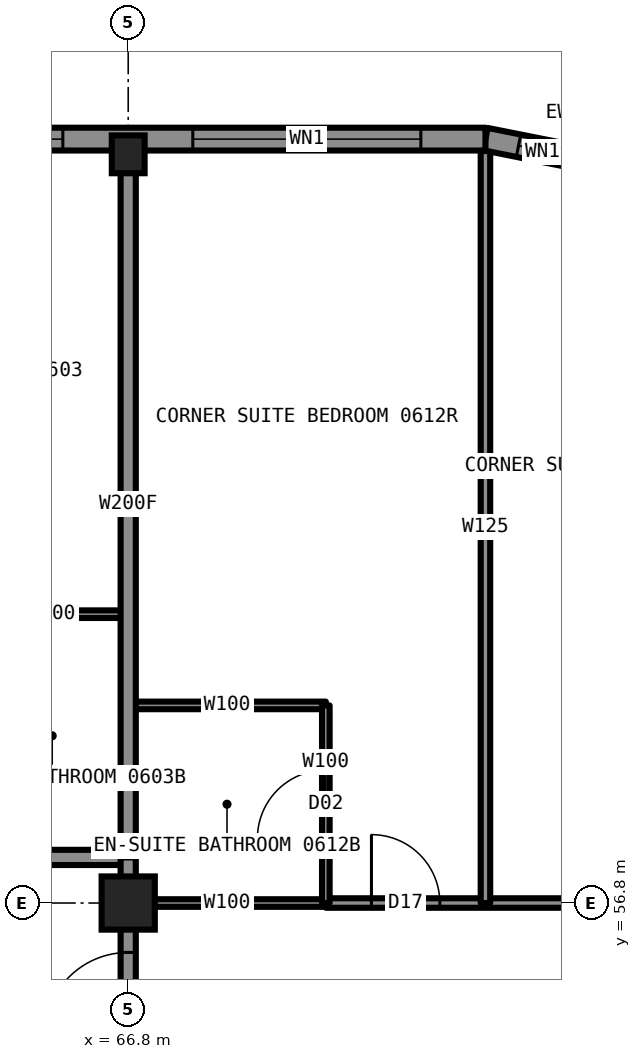
"""IFC4 building model, lengths in metres.
Left out: names, types, materials, properties, quantities, classifications, styles, units other than length and angle.
Written with IfcOpenShell. Run it as: python <this file> out.ifc"""

import sys

from ifc_helpers import new_model, si_unit, direction, frame, frame_2d, origin, origin_2d, place, context, subcontext, project, spatial, rectangle, hollow_rectangle, i_section, extrude, element, fill, save


model = new_model("IFC4")
c1 = context("Model", 3, precision=1e-05, world=origin(), true_north=direction((0.0, 1.0)))
c2 = subcontext(c1, "Body", "Model", "MODEL_VIEW")
j1 = project(units=[si_unit("LENGTHUNIT", "METRE"), si_unit("PLANEANGLEUNIT", "RADIAN")], contexts=[c1])
p1 = place(None, origin())
s1 = spatial("IfcSite", under=j1, at=p1, CompositionType="ELEMENT")
p2 = place(p1, origin())
s2 = spatial("IfcBuilding", under=s1, at=p2, CompositionType="ELEMENT")
p3 = place(p2, frame((0.0, 0.0, 28.5)))
s3 = spatial("IfcBuildingStorey", under=s2, at=p3, CompositionType="ELEMENT", Elevation=28.5)
p4 = place(p3, frame((66.8, 66.65, 0.0), z_axis=(0.0, 0.0, 1.0), x_axis=(1.0, 0.0, 0.0)))
e1 = element("IfcColumn", 1, at=p4, inside=s3, PredefinedType="COLUMN", context=c2, shape_type="SweptSolid", body=[
    extrude(i_section(OverallWidth=0.432, OverallDepth=0.498, WebThickness=0.056, FlangeThickness=0.089, at=origin_2d()), origin(), (0.0, 0.0, 1.0), 3.5),
])
p5 = place(p3, frame((66.8, 56.8, 0.0), z_axis=(0.0, 0.0, 1.0), x_axis=(1.0, 0.0, 0.0)))
e2 = element("IfcColumn", 2, at=p5, inside=s3, PredefinedType="COLUMN", context=c2, shape_type="SweptSolid", body=[
    extrude(hollow_rectangle(XDim=0.7, YDim=0.7, WallThickness=0.06, at=origin_2d()), origin(), (0.0, 0.0, 1.0), 3.5),
])
p6 = place(p3, frame((66.8, 56.8, 0.0), z_axis=(0.0, 0.0, 1.0), x_axis=(1.0, 0.0, 0.0)))
e3 = element("IfcWall", 3, at=p6, inside=s3, PredefinedType="PARTITIONING", context=c2, shape_type="SweptSolid", body=[
    extrude(rectangle(XDim=2.6, YDim=0.1, at=frame_2d((1.3, 0.0))), origin(), (0.0, 0.0, 1.0), 2.573),
])
p7 = place(p3, frame((69.4, 56.8, 0.0), z_axis=(0.0, 0.0, 1.0), x_axis=(1.0, 0.0, 0.0)))
e4 = element("IfcWall", 4, at=p7, inside=s3, PredefinedType="PARTITIONING", context=c2, shape_type="SweptSolid", body=[
    extrude(rectangle(XDim=7.3, YDim=0.125, at=frame_2d((3.65, 0.0))), origin(), (0.0, 0.0, 1.0), 2.573),
])
p8 = place(p7, frame((0.6, 0.0, 0.0)))
e5 = element("IfcOpeningElement", 5, at=p8, cuts=e4, PredefinedType="OPENING", context=c2, shape_type="SweptSolid", body=[
    extrude(rectangle(XDim=0.9, YDim=2.2, at=frame_2d((0.45, 1.1))), frame((0.0, 0.073, 0.0), z_axis=(0.0, -1.0, 0.0), x_axis=(1.0, 0.0, 0.0)), (0.0, 0.0, 1.0), 0.145),
])
p9 = place(p7, frame((4.4, 0.0, 0.0)))
e6 = element("IfcOpeningElement", 6, at=p9, cuts=e4, PredefinedType="OPENING", context=c2, shape_type="SweptSolid", body=[
    extrude(rectangle(XDim=0.9, YDim=2.2, at=frame_2d((0.45, 1.1))), frame((0.0, 0.073, 0.0), z_axis=(0.0, -1.0, 0.0), x_axis=(1.0, 0.0, 0.0)), (0.0, 0.0, 1.0), 0.145),
])
p10 = place(p3, frame((43.2, 57.4, 0.0), z_axis=(0.0, 0.0, 1.0), x_axis=(1.0, 0.0, 0.0)))
e7 = element("IfcWall", 7, at=p10, inside=s3, PredefinedType="PARTITIONING", context=c2, shape_type="SweptSolid", body=[
    extrude(rectangle(XDim=23.6, YDim=0.2, at=frame_2d((11.8, 0.0))), origin(), (0.0, 0.0, 1.0), 3.33),
])
p11 = place(p10, frame((1.85, 0.0, 0.0)))
e8 = element("IfcOpeningElement", 8, at=p11, cuts=e7, PredefinedType="OPENING", context=c2, shape_type="SweptSolid", body=[
    extrude(rectangle(XDim=1.1, YDim=2.2, at=frame_2d((0.55, 1.1))), frame((0.0, 0.11, 0.0), z_axis=(0.0, -1.0, 0.0), x_axis=(1.0, 0.0, 0.0)), (0.0, 0.0, 1.0), 0.22),
])
p12 = place(p10, frame((15.62, 0.0, 0.0)))
e9 = element("IfcOpeningElement", 9, at=p12, cuts=e7, PredefinedType="OPENING", context=c2, shape_type="SweptSolid", body=[
    extrude(rectangle(XDim=1.0, YDim=2.2, at=frame_2d((0.5, 1.1))), frame((0.0, 0.11, 0.0), z_axis=(0.0, -1.0, 0.0), x_axis=(1.0, 0.0, 0.0)), (0.0, 0.0, 1.0), 0.22),
])
p13 = place(p10, frame((20.34, 0.0, 0.0)))
e10 = element("IfcOpeningElement", 10, at=p13, cuts=e7, PredefinedType="OPENING", context=c2, shape_type="SweptSolid", body=[
    extrude(rectangle(XDim=1.0, YDim=2.2, at=frame_2d((0.5, 1.1))), frame((0.0, 0.11, 0.0), z_axis=(0.0, -1.0, 0.0), x_axis=(1.0, 0.0, 0.0)), (0.0, 0.0, 1.0), 0.22),
])
p14 = place(p3, frame((66.8, 59.4, 0.0), z_axis=(0.0, 0.0, 1.0), x_axis=(1.0, 0.0, 0.0)))
e11 = element("IfcWall", 11, at=p14, inside=s3, PredefinedType="PARTITIONING", context=c2, shape_type="SweptSolid", body=[
    extrude(rectangle(XDim=2.6, YDim=0.1, at=frame_2d((1.3, 0.0))), origin(), (0.0, 0.0, 1.0), 3.33),
])
p15 = place(p3, frame((64.8, 60.6, 0.0), z_axis=(0.0, 0.0, 1.0), x_axis=(1.0, 0.0, 0.0)))
e12 = element("IfcWall", 12, at=p15, inside=s3, PredefinedType="PARTITIONING", context=c2, shape_type="SweptSolid", body=[
    extrude(rectangle(XDim=2.0, YDim=0.1, at=frame_2d((1.0, 0.0))), origin(), (0.0, 0.0, 1.0), 3.33),
])
p16 = place(p3, frame((66.8, 33.22, 0.0), z_axis=(0.0, 0.0, 1.0), x_axis=(0.0, 1.0, 0.0)))
e13 = element("IfcWall", 13, at=p16, inside=s3, PredefinedType="PARTITIONING", context=c2, shape_type="SweptSolid", body=[
    extrude(rectangle(XDim=23.56, YDim=0.2, at=frame_2d((11.78, 0.0))), origin(), (0.0, 0.0, 1.0), 3.33),
])
p17 = place(p16, frame((7.85, 0.0, 0.0)))
e14 = element("IfcOpeningElement", 14, at=p17, cuts=e13, PredefinedType="OPENING", context=c2, shape_type="SweptSolid", body=[
    extrude(rectangle(XDim=1.0, YDim=2.2, at=frame_2d((0.5, 1.1))), frame((0.0, 0.11, 0.0), z_axis=(0.0, -1.0, 0.0), x_axis=(1.0, 0.0, 0.0)), (0.0, 0.0, 1.0), 0.22),
])
p18 = place(p16, frame((12.42, 0.0, 0.0)))
e15 = element("IfcOpeningElement", 15, at=p18, cuts=e13, PredefinedType="OPENING", context=c2, shape_type="SweptSolid", body=[
    extrude(rectangle(XDim=1.0, YDim=2.2, at=frame_2d((0.5, 1.1))), frame((0.0, 0.11, 0.0), z_axis=(0.0, -1.0, 0.0), x_axis=(1.0, 0.0, 0.0)), (0.0, 0.0, 1.0), 0.22),
])
p19 = place(p16, frame((21.83, 0.0, 0.0)))
e16 = element("IfcOpeningElement", 16, at=p19, cuts=e13, PredefinedType="OPENING", context=c2, shape_type="SweptSolid", body=[
    extrude(rectangle(XDim=1.1, YDim=2.2, at=frame_2d((0.55, 1.1))), frame((0.0, 0.11, 0.0), z_axis=(0.0, -1.0, 0.0), x_axis=(1.0, 0.0, 0.0)), (0.0, 0.0, 1.0), 0.22),
])
p20 = place(p16, frame((0.63, 0.0, 0.0)))
e17 = element("IfcOpeningElement", 17, at=p20, cuts=e13, PredefinedType="OPENING", context=c2, shape_type="SweptSolid", body=[
    extrude(rectangle(XDim=1.1, YDim=2.2, at=frame_2d((0.55, 1.1))), frame((0.0, 0.11, 0.0), z_axis=(0.0, -1.0, 0.0), x_axis=(1.0, 0.0, 0.0)), (0.0, 0.0, 1.0), 0.22),
])
p21 = place(p3, frame((66.8, 57.4, 0.0), z_axis=(0.0, 0.0, 1.0), x_axis=(0.0, 1.0, 0.0)))
e18 = element("IfcWall", 18, at=p21, inside=s3, PredefinedType="PARTITIONING", context=c2, shape_type="SweptSolid", body=[
    extrude(rectangle(XDim=9.3, YDim=0.2, at=frame_2d((4.65, 0.0))), origin(), (0.0, 0.0, 1.0), 2.573),
])
p22 = place(p3, frame((69.4, 56.8, 0.0), z_axis=(0.0, 0.0, 1.0), x_axis=(0.0, 1.0, 0.0)))
e19 = element("IfcWall", 19, at=p22, inside=s3, PredefinedType="PARTITIONING", context=c2, shape_type="SweptSolid", body=[
    extrude(rectangle(XDim=2.6, YDim=0.1, at=frame_2d((1.3, 0.0))), origin(), (0.0, 0.0, 1.0), 3.33),
])
p23 = place(p22, frame((0.85, 0.0, 0.0)))
e20 = element("IfcOpeningElement", 20, at=p23, cuts=e19, PredefinedType="OPENING", context=c2, shape_type="SweptSolid", body=[
    extrude(rectangle(XDim=0.9, YDim=2.1, at=frame_2d((0.45, 1.05))), frame((0.0, 0.06, 0.0), z_axis=(0.0, -1.0, 0.0), x_axis=(1.0, 0.0, 0.0)), (0.0, 0.0, 1.0), 0.12),
])
p24 = place(p3, frame((71.5, 56.8, 0.0), z_axis=(0.0, 0.0, 1.0), x_axis=(0.0, 1.0, 0.0)))
e21 = element("IfcWall", 21, at=p24, inside=s3, PredefinedType="PARTITIONING", context=c2, shape_type="SweptSolid", body=[
    extrude(rectangle(XDim=9.894, YDim=0.125, at=frame_2d((4.947, 0.0))), origin(), (0.0, 0.0, 1.0), 3.33),
])
p25 = place(p3, frame((73.547, 66.443, 0.0), z_axis=(0.0, 0.0, 1.0), x_axis=(-0.980787050784, 0.195081421501, 0.0)))
e22 = element("IfcWall", 22, at=p25, inside=s3, PredefinedType="SOLIDWALL", context=c2, shape_type="SweptSolid", body=[
    extrude(rectangle(XDim=2.087, YDim=0.3, at=frame_2d((1.044, 0.0))), origin(), (0.0, 0.0, 1.0), 3.33),
])
p26 = place(p25, frame((0.844, 0.0, 0.5)))
e23 = element("IfcOpeningElement", 23, at=p26, cuts=e22, PredefinedType="OPENING", context=c2, shape_type="SweptSolid", body=[
    extrude(rectangle(XDim=0.8, YDim=1.1, at=frame_2d((0.4, 0.55))), frame((0.0, 0.16, 0.0), z_axis=(0.0, -1.0, 0.0), x_axis=(1.0, 0.0, 0.0)), (0.0, 0.0, 1.0), 0.32),
])
p27 = place(p3, frame((71.5, 66.85, 0.0), z_axis=(0.0, 0.0, 1.0), x_axis=(-1.0, 0.0, 0.0)))
e24 = element("IfcWall", 24, at=p27, inside=s3, PredefinedType="SOLIDWALL", context=c2, shape_type="SweptSolid", body=[
    extrude(rectangle(XDim=33.0, YDim=0.3, at=frame_2d((16.5, 0.0))), origin(), (0.0, 0.0, 1.0), 2.83),
])
p28 = place(p27, frame((0.85, 0.0, 0.5)))
e25 = element("IfcOpeningElement", 25, at=p28, cuts=e24, PredefinedType="OPENING", context=c2, shape_type="SweptSolid", body=[
    extrude(rectangle(XDim=3.0, YDim=2.0, at=frame_2d((1.5, 1.0))), frame((0.0, 0.16, 0.0), z_axis=(0.0, -1.0, 0.0), x_axis=(1.0, 0.0, 0.0)), (0.0, 0.0, 1.0), 0.32),
])
p29 = place(p27, frame((5.56, 0.0, 0.5)))
e26 = element("IfcOpeningElement", 26, at=p29, cuts=e24, PredefinedType="OPENING", context=c2, shape_type="SweptSolid", body=[
    extrude(rectangle(XDim=3.0, YDim=2.0, at=frame_2d((1.5, 1.0))), frame((0.0, 0.16, 0.0), z_axis=(0.0, -1.0, 0.0), x_axis=(1.0, 0.0, 0.0)), (0.0, 0.0, 1.0), 0.32),
])
p30 = place(p27, frame((10.28, 0.0, 0.5)))
e27 = element("IfcOpeningElement", 27, at=p30, cuts=e24, PredefinedType="OPENING", context=c2, shape_type="SweptSolid", body=[
    extrude(rectangle(XDim=3.0, YDim=2.0, at=frame_2d((1.5, 1.0))), frame((0.0, 0.16, 0.0), z_axis=(0.0, -1.0, 0.0), x_axis=(1.0, 0.0, 0.0)), (0.0, 0.0, 1.0), 0.32),
])
p31 = place(p27, frame((15.0, 0.0, 0.5)))
e28 = element("IfcOpeningElement", 28, at=p31, cuts=e24, PredefinedType="OPENING", context=c2, shape_type="SweptSolid", body=[
    extrude(rectangle(XDim=3.0, YDim=2.0, at=frame_2d((1.5, 1.0))), frame((0.0, 0.16, 0.0), z_axis=(0.0, -1.0, 0.0), x_axis=(1.0, 0.0, 0.0)), (0.0, 0.0, 1.0), 0.32),
])
p32 = place(p27, frame((19.72, 0.0, 0.5)))
e29 = element("IfcOpeningElement", 29, at=p32, cuts=e24, PredefinedType="OPENING", context=c2, shape_type="SweptSolid", body=[
    extrude(rectangle(XDim=3.0, YDim=2.0, at=frame_2d((1.5, 1.0))), frame((0.0, 0.16, 0.0), z_axis=(0.0, -1.0, 0.0), x_axis=(1.0, 0.0, 0.0)), (0.0, 0.0, 1.0), 0.32),
])
p33 = place(p27, frame((24.44, 0.0, 0.5)))
e30 = element("IfcOpeningElement", 30, at=p33, cuts=e24, PredefinedType="OPENING", context=c2, shape_type="SweptSolid", body=[
    extrude(rectangle(XDim=3.0, YDim=2.0, at=frame_2d((1.5, 1.0))), frame((0.0, 0.16, 0.0), z_axis=(0.0, -1.0, 0.0), x_axis=(1.0, 0.0, 0.0)), (0.0, 0.0, 1.0), 0.32),
])
p34 = place(p27, frame((29.15, 0.0, 0.5)))
e31 = element("IfcOpeningElement", 31, at=p34, cuts=e24, PredefinedType="OPENING", context=c2, shape_type="SweptSolid", body=[
    extrude(rectangle(XDim=3.0, YDim=2.0, at=frame_2d((1.5, 1.0))), frame((0.0, 0.16, 0.0), z_axis=(0.0, -1.0, 0.0), x_axis=(1.0, 0.0, 0.0)), (0.0, 0.0, 1.0), 0.32),
])
p35 = place(p3, frame((66.8, 56.78, 0.0), z_axis=(0.0, 0.0, 1.0), x_axis=(0.0, 1.0, 0.0)))
e32 = element("IfcWall", 32, at=p35, inside=s3, PredefinedType="PARTITIONING", context=c2, shape_type="SweptSolid", body=[
    extrude(rectangle(XDim=0.62, YDim=0.2, at=frame_2d((0.31, 0.0))), origin(), (0.0, 0.0, 1.0), 2.573),
])
p36 = place(p19, origin())
e33 = element("IfcDoor", 33, at=p36, inside=s3, OperationType="SINGLE_SWING_LEFT", PredefinedType="DOOR", context=c2, shape_type="SweptSolid", body=[
    extrude(rectangle(XDim=1.1, YDim=2.2, at=frame_2d((0.55, 1.1))), frame((0.0, 0.025, 0.0), z_axis=(0.0, -1.0, 0.0), x_axis=(1.0, 0.0, 0.0)), (0.0, 0.0, 1.0), 0.05),
])
fill(e16, e33)
p37 = place(p23, origin())
e34 = element("IfcDoor", 34, at=p37, inside=s3, OperationType="SINGLE_SWING_RIGHT", PredefinedType="DOOR", context=c2, shape_type="SweptSolid", body=[
    extrude(rectangle(XDim=0.9, YDim=2.1, at=frame_2d((0.45, 1.05))), frame((0.0, 0.025, 0.0), z_axis=(0.0, -1.0, 0.0), x_axis=(1.0, 0.0, 0.0)), (0.0, 0.0, 1.0), 0.05),
])
fill(e20, e34)
p38 = place(p8, origin())
e35 = element("IfcDoor", 35, at=p38, inside=s3, OperationType="SINGLE_SWING_LEFT", PredefinedType="DOOR", context=c2, shape_type="SweptSolid", body=[
    extrude(rectangle(XDim=0.9, YDim=2.2, at=frame_2d((0.45, 1.1))), frame((0.0, 0.025, 0.0), z_axis=(0.0, -1.0, 0.0), x_axis=(1.0, 0.0, 0.0)), (0.0, 0.0, 1.0), 0.05),
])
fill(e5, e35)
p39 = place(p26, origin())
e36 = element("IfcWindow", 36, at=p39, inside=s3, PartitioningType="SINGLE_PANEL", PredefinedType="WINDOW", context=c2, shape_type="SweptSolid", body=[
    extrude(rectangle(XDim=0.8, YDim=1.1, at=frame_2d((0.4, 0.55))), frame((0.0, 0.03, 0.0), z_axis=(0.0, -1.0, 0.0), x_axis=(1.0, 0.0, 0.0)), (0.0, 0.0, 1.0), 0.06),
])
fill(e23, e36)
p40 = place(p28, origin())
e37 = element("IfcWindow", 37, at=p40, inside=s3, PartitioningType="SINGLE_PANEL", PredefinedType="WINDOW", context=c2, shape_type="SweptSolid", body=[
    extrude(rectangle(XDim=3.0, YDim=2.0, at=frame_2d((1.5, 1.0))), frame((0.0, 0.03, 0.0), z_axis=(0.0, -1.0, 0.0), x_axis=(1.0, 0.0, 0.0)), (0.0, 0.0, 1.0), 0.06),
])
fill(e25, e37)
p41 = place(p29, origin())
e38 = element("IfcWindow", 38, at=p41, inside=s3, PartitioningType="SINGLE_PANEL", PredefinedType="WINDOW", context=c2, shape_type="SweptSolid", body=[
    extrude(rectangle(XDim=3.0, YDim=2.0, at=frame_2d((1.5, 1.0))), frame((0.0, 0.03, 0.0), z_axis=(0.0, -1.0, 0.0), x_axis=(1.0, 0.0, 0.0)), (0.0, 0.0, 1.0), 0.06),
])
fill(e26, e38)
save(model, sys.argv[1])
